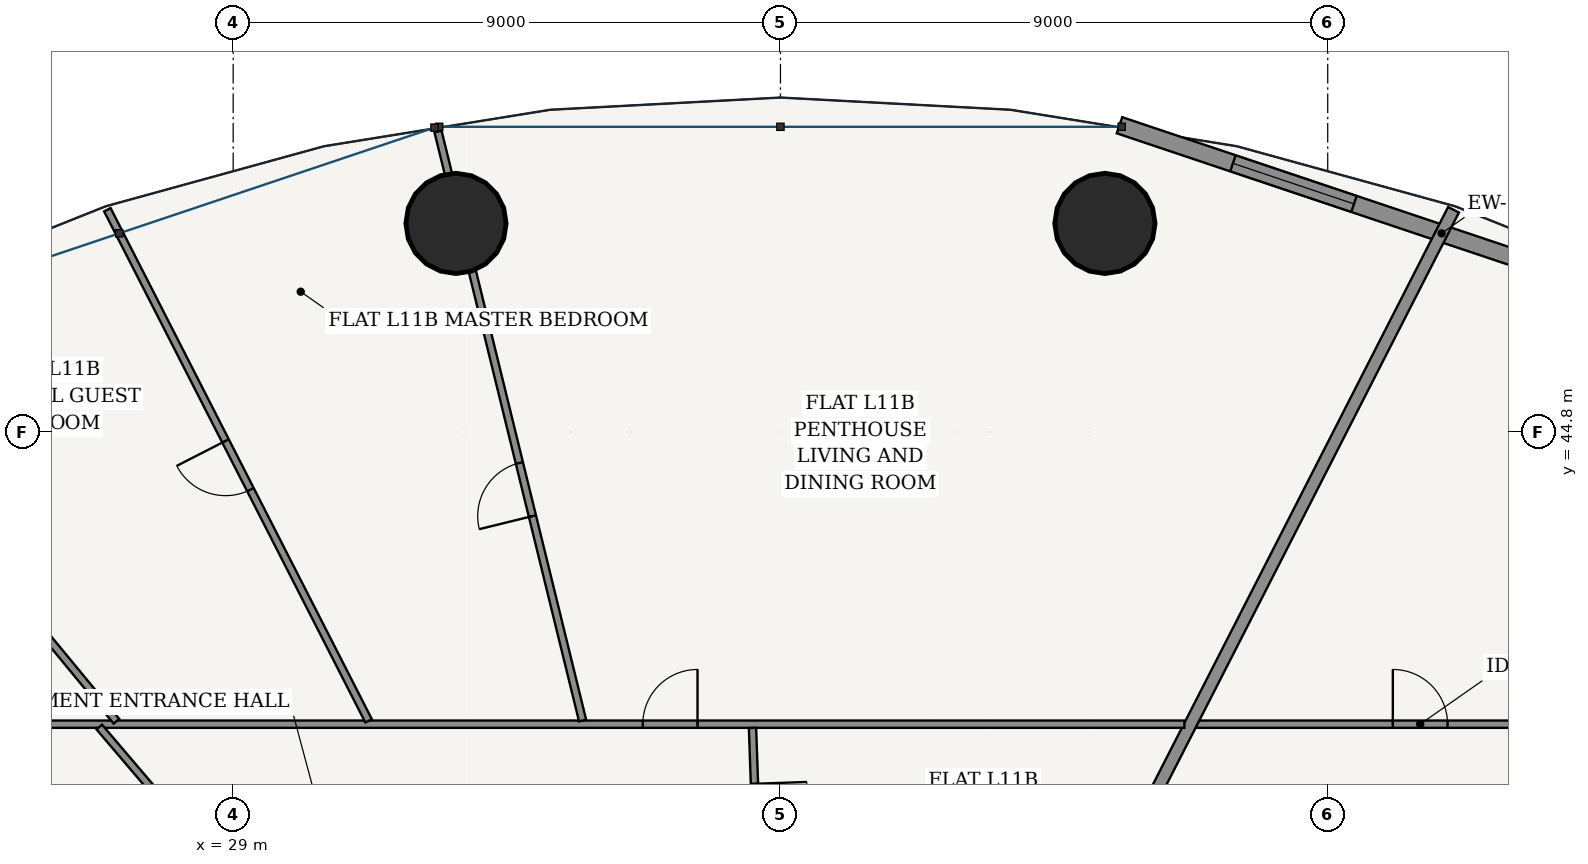
"""IFC4 building model, lengths in metres.
Left out: names, types, materials, properties, quantities, classifications, styles, units other than length and angle.
Written with IfcOpenShell. Run it as: python <this file> out.ifc"""

import sys

from ifc_helpers import new_model, si_unit, direction, frame, frame_2d, origin, origin_2d, place, context, subcontext, project, spatial, rectangle, hollow_circle, extrude, source, transform, mapped, element, fill, save


model = new_model("IFC4")
c1 = context("Model", 3, precision=1e-05, world=origin(), true_north=direction((-0.2419218956, 0.970295726276)))
c2 = subcontext(c1, "Body", "Model", "MODEL_VIEW")
j1 = project(units=[si_unit("LENGTHUNIT", "METRE"), si_unit("PLANEANGLEUNIT", "RADIAN")], contexts=[c1])
p1 = place(None, origin())
s1 = spatial("IfcSite", under=j1, at=p1, CompositionType="ELEMENT")
p2 = place(p1, origin())
s2 = spatial("IfcBuilding", under=s1, at=p2, CompositionType="ELEMENT")
p3 = place(p2, frame((0.0, 0.0, 45.6)))
s3 = spatial("IfcBuildingStorey", under=s2, at=p3, CompositionType="ELEMENT", Elevation=45.6)
for number, where, z_axis, x_axis in (
    (1, (43.336, 48.23, 0.0), (0.0, 0.0, 1.0), (1.0, 0.0, 0.0)),
    (2, (32.664, 48.23, 0.0), (0.0, 0.0, 1.0), (1.0, 0.0, 0.0)),
):
    element("IfcColumn", number, at=place(p3, frame(where, z_axis=z_axis, x_axis=x_axis)), inside=s3, PredefinedType="COLUMN", context=c2, shape_type="SweptSolid", body=[
        extrude(hollow_circle(Radius=0.825, WallThickness=0.05, at=origin_2d()), origin(), (0.0, 0.0, 1.0), 3.6),
    ])
p4 = place(p3, frame((54.171, 46.289, 0.0), z_axis=(0.0, 0.0, 1.0), x_axis=(-0.948041258496, 0.318147406385, 0.0)))
e3 = element("IfcWall", 3, at=p4, inside=s3, PredefinedType="SOLIDWALL", context=c2, shape_type="SweptSolid", body=[
    extrude(rectangle(XDim=11.175, YDim=0.28, at=frame_2d((5.588, 0.0))), origin(), (0.0, 0.0, 1.0), 3.32),
])
p5 = place(p4, frame((1.967, 0.0, 0.85)))
e4 = element("IfcOpeningElement", 4, at=p5, cuts=e3, PredefinedType="OPENING", context=c2, shape_type="SweptSolid", body=[
    extrude(rectangle(XDim=2.1, YDim=1.95, at=frame_2d((1.05, 0.975))), frame((0.0, 0.15, 0.0), z_axis=(0.0, -1.0, 0.0), x_axis=(1.0, 0.0, 0.0)), (0.0, 0.0, 1.0), 0.3),
])
p6 = place(p4, frame((7.108, 0.0, 0.85)))
e5 = element("IfcOpeningElement", 5, at=p6, cuts=e3, PredefinedType="OPENING", context=c2, shape_type="SweptSolid", body=[
    extrude(rectangle(XDim=2.1, YDim=1.95, at=frame_2d((1.05, 0.975))), frame((0.0, 0.15, 0.0), z_axis=(0.0, -1.0, 0.0), x_axis=(1.0, 0.0, 0.0)), (0.0, 0.0, 1.0), 0.3),
])
p7 = place(p3, frame((44.847, 39.995, 0.0), z_axis=(0.0, 0.0, 1.0), x_axis=(1.0, 0.0, 0.0)))
e6 = element("IfcWall", 6, at=p7, inside=s3, PredefinedType="PARTITIONING", context=c2, shape_type="SweptSolid", body=[
    extrude(rectangle(XDim=7.348, YDim=0.12, at=frame_2d((3.674, 0.0))), origin(), (0.0, 0.0, 1.0), 2.688),
])
p8 = place(p7, frame((3.224, 0.0, 0.0)))
e7 = element("IfcOpeningElement", 7, at=p8, cuts=e6, PredefinedType="OPENING", context=c2, shape_type="SweptSolid", body=[
    extrude(rectangle(XDim=0.9, YDim=2.15, at=frame_2d((0.45, 1.075))), frame((0.0, 0.07, 0.0), z_axis=(0.0, -1.0, 0.0), x_axis=(1.0, 0.0, 0.0)), (0.0, 0.0, 1.0), 0.14),
])
p9 = place(p3, frame((43.335, 37.237, 0.0), z_axis=(0.0, 0.0, 1.0), x_axis=(0.455148959499, 0.890415310216, 0.0)))
e8 = element("IfcWall", 8, at=p9, inside=s3, PredefinedType="PARTITIONING", context=c2, shape_type="SweptSolid", body=[
    extrude(rectangle(XDim=12.598, YDim=0.2, at=frame_2d((6.299, 0.0))), origin(), (0.0, 0.0, 1.0), 2.762),
])
p10 = place(p3, frame((23.805, 39.995, 0.0), z_axis=(0.0, 0.0, 1.0), x_axis=(1.0, 0.0, 0.0)))
e9 = element("IfcWall", 9, at=p10, inside=s3, PredefinedType="PARTITIONING", context=c2, shape_type="SweptSolid", body=[
    extrude(rectangle(XDim=20.838, YDim=0.12, at=frame_2d((10.419, 0.0))), origin(), (0.0, 0.0, 1.0), 2.688),
])
p11 = place(p10, frame((11.931, 0.0, 0.0)))
e10 = element("IfcOpeningElement", 10, at=p11, cuts=e9, PredefinedType="OPENING", context=c2, shape_type="SweptSolid", body=[
    extrude(rectangle(XDim=0.9, YDim=2.15, at=frame_2d((0.45, 1.075))), frame((0.0, 0.07, 0.0), z_axis=(0.0, -1.0, 0.0), x_axis=(1.0, 0.0, 0.0)), (0.0, 0.0, 1.0), 0.14),
])
p12 = place(p3, frame((34.746, 40.055, 0.0), z_axis=(0.0, 0.0, 1.0), x_axis=(-0.238386209483, 0.971170435675, 0.0)))
e11 = element("IfcWall", 11, at=p12, inside=s3, PredefinedType="PARTITIONING", context=c2, shape_type="SweptSolid", body=[
    extrude(rectangle(XDim=9.973, YDim=0.12, at=frame_2d((4.987, 0.0))), origin(), (0.0, 0.0, 1.0), 2.688),
])
p13 = place(p12, frame((3.461, 0.0, 0.0)))
e12 = element("IfcOpeningElement", 12, at=p13, cuts=e11, PredefinedType="OPENING", context=c2, shape_type="SweptSolid", body=[
    extrude(rectangle(XDim=0.9, YDim=2.15, at=frame_2d((0.45, 1.075))), frame((0.0, 0.07, 0.0), z_axis=(0.0, -1.0, 0.0), x_axis=(1.0, 0.0, 0.0)), (0.0, 0.0, 1.0), 0.14),
])
p14 = place(p3, frame((31.227, 40.05, 0.0), z_axis=(0.0, 0.0, 1.0), x_axis=(-0.455142050367, 0.890418841887, 0.0)))
e13 = element("IfcWall", 13, at=p14, inside=s3, PredefinedType="PARTITIONING", context=c2, shape_type="SweptSolid", body=[
    extrude(rectangle(XDim=9.438, YDim=0.12, at=frame_2d((4.719, 0.0))), origin(), (0.0, 0.0, 1.0), 2.762),
])
p15 = place(p14, frame((4.269, 0.0, 0.0)))
e14 = element("IfcOpeningElement", 14, at=p15, cuts=e13, PredefinedType="OPENING", context=c2, shape_type="SweptSolid", body=[
    extrude(rectangle(XDim=0.9, YDim=2.15, at=frame_2d((0.45, 1.075))), frame((0.0, 0.07, 0.0), z_axis=(0.0, -1.0, 0.0), x_axis=(1.0, 0.0, 0.0)), (0.0, 0.0, 1.0), 0.14),
])
p16 = place(p3, frame((27.081, 40.043, 0.0), z_axis=(0.0, 0.0, 1.0), x_axis=(-0.636193310573, 0.771529695852, 0.0)))
e15 = element("IfcWall", 15, at=p16, inside=s3, PredefinedType="PARTITIONING", context=c2, shape_type="SweptSolid", body=[
    extrude(rectangle(XDim=8.044, YDim=0.12, at=frame_2d((4.022, 0.0))), origin(), (0.0, 0.0, 1.0), 2.688),
])
p17 = place(p3, frame((37.635, 37.237, 0.0), z_axis=(0.0, 0.0, 1.0), x_axis=(-0.03493293564, 0.999389658746, 0.0)))
e16 = element("IfcWall", 16, at=p17, inside=s3, PredefinedType="PARTITIONING", context=c2, shape_type="SweptSolid", body=[
    extrude(rectangle(XDim=2.698, YDim=0.12, at=frame_2d((1.349, 0.0))), origin(), (0.0, 0.0, 1.0), 3.32),
])
p18 = place(p17, frame((0.919, 0.0, 0.0)))
e17 = element("IfcOpeningElement", 17, at=p18, cuts=e16, PredefinedType="OPENING", context=c2, shape_type="SweptSolid", body=[
    extrude(rectangle(XDim=0.86, YDim=2.15, at=frame_2d((0.43, 1.075))), frame((0.0, 0.07, 0.0), z_axis=(0.0, -1.0, 0.0), x_axis=(1.0, 0.0, 0.0)), (0.0, 0.0, 1.0), 0.14),
])
p19 = place(p3, frame((29.108, 37.237, 0.0), z_axis=(0.0, 0.0, 1.0), x_axis=(-0.648553247009, 0.761169288526, 0.0)))
e18 = element("IfcWall", 18, at=p19, inside=s3, PredefinedType="PARTITIONING", context=c2, shape_type="SweptSolid", body=[
    extrude(rectangle(XDim=3.562, YDim=0.12, at=frame_2d((1.781, 0.0))), origin(), (0.0, 0.0, 1.0), 2.999),
])
p20 = place(p19, frame((1.331, 0.0, 0.0)))
e19 = element("IfcOpeningElement", 19, at=p20, cuts=e18, PredefinedType="OPENING", context=c2, shape_type="SweptSolid", body=[
    extrude(rectangle(XDim=0.9, YDim=2.15, at=frame_2d((0.45, 1.075))), frame((0.0, 0.07, 0.0), z_axis=(0.0, -1.0, 0.0), x_axis=(1.0, 0.0, 0.0)), (0.0, 0.0, 1.0), 0.14),
])
p21 = place(p3, frame((26.565, 32.991, 0.0), z_axis=(0.0, 0.0, 1.0), x_axis=(-0.879369737803, 0.476139542819, 0.0)))
e20 = element("IfcWall", 20, at=p21, inside=s3, PredefinedType="PARTITIONING", context=c2, shape_type="SweptSolid", body=[
    extrude(rectangle(XDim=14.295, YDim=0.2, at=frame_2d((7.147, 0.0))), origin(), (0.0, 0.0, 1.0), 2.688),
])
m1 = source(origin(), c2, "Body", "SweptSolid", [
    extrude(rectangle(XDim=2.1, YDim=1.95, at=frame_2d((1.05, 0.975))), frame((0.0, 0.03, 0.0), z_axis=(0.0, -1.0, 0.0), x_axis=(1.0, 0.0, 0.0)), (0.0, 0.0, 1.0), 0.06),
])
p22 = place(p6, origin())
e21 = element("IfcWindow", 21, at=p22, inside=s3, PartitioningType="SINGLE_PANEL", PredefinedType="WINDOW", context=c2, shape_type="MappedRepresentation", body=[
    mapped(m1, transform((0.0, 0.0, 0.0), scale=1.0)),
])
fill(e5, e21)
m2 = source(origin(), c2, "Body", "SweptSolid", [
    extrude(rectangle(XDim=0.9, YDim=2.15, at=frame_2d((0.45, 1.075))), frame((0.0, 0.025, 0.0), z_axis=(0.0, -1.0, 0.0), x_axis=(1.0, 0.0, 0.0)), (0.0, 0.0, 1.0), 0.05),
])
p23 = place(p8, origin())
e22 = element("IfcDoor", 22, at=p23, inside=s3, OperationType="SINGLE_SWING_LEFT", PredefinedType="DOOR", context=c2, shape_type="MappedRepresentation", body=[
    mapped(m2, transform((0.0, 0.0, 0.0), scale=1.0)),
])
fill(e7, e22)
m3 = source(origin(), c2, "Body", "SweptSolid", [
    extrude(rectangle(XDim=0.86, YDim=2.15, at=frame_2d((0.43, 1.075))), frame((0.0, 0.025, 0.0), z_axis=(0.0, -1.0, 0.0), x_axis=(1.0, 0.0, 0.0)), (0.0, 0.0, 1.0), 0.05),
])
p24 = place(p18, frame((0.86, 0.0, 0.0), z_axis=(0.0, 0.0, 1.0), x_axis=(-1.0, 0.0, 0.0)))
e23 = element("IfcDoor", 23, at=p24, inside=s3, OperationType="SINGLE_SWING_LEFT", PredefinedType="DOOR", context=c2, shape_type="MappedRepresentation", body=[
    mapped(m3, transform((0.0, 0.0, 0.0), scale=1.0)),
])
fill(e17, e23)
p25 = place(p11, origin())
e24 = element("IfcDoor", 24, at=p25, inside=s3, OperationType="SINGLE_SWING_RIGHT", PredefinedType="DOOR", context=c2, shape_type="MappedRepresentation", body=[
    mapped(m2, transform((0.0, 0.0, 0.0), scale=1.0)),
])
fill(e10, e24)
p26 = place(p13, origin())
e25 = element("IfcDoor", 25, at=p26, inside=s3, OperationType="SINGLE_SWING_LEFT", PredefinedType="DOOR", context=c2, shape_type="MappedRepresentation", body=[
    mapped(m2, transform((0.0, 0.0, 0.0), scale=1.0)),
])
fill(e12, e25)
p27 = place(p15, origin())
e26 = element("IfcDoor", 26, at=p27, inside=s3, OperationType="SINGLE_SWING_RIGHT", PredefinedType="DOOR", context=c2, shape_type="MappedRepresentation", body=[
    mapped(m2, transform((0.0, 0.0, 0.0), scale=1.0)),
])
fill(e14, e26)
save(model, sys.argv[1])
